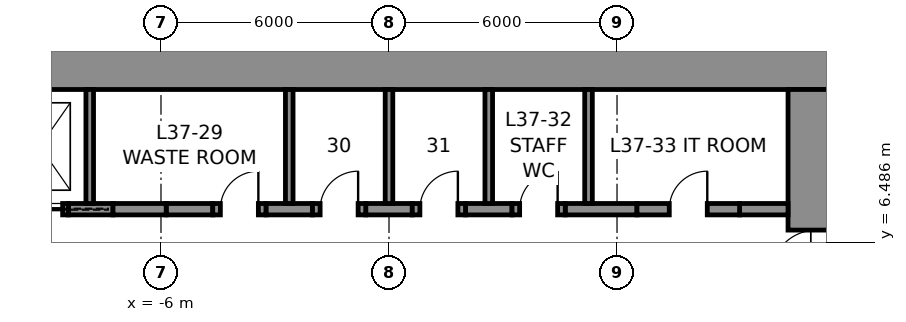
"""IFC4 building model, lengths in metres.
Left out: names, types, materials, properties, quantities, classifications, styles, units other than length and angle.
Written with IfcOpenShell. Run it as: python <this file> out.ifc"""

import sys

from ifc_helpers import new_model, si_unit, direction, frame, frame_2d, origin, place, context, subcontext, project, spatial, rectangle, extrude, element, fill, save


model = new_model("IFC4")
c1 = context("Model", 3, precision=1e-05, world=origin(), true_north=direction((0.0, 1.0)))
c2 = subcontext(c1, "Body", "Model", "MODEL_VIEW")
j1 = project(units=[si_unit("LENGTHUNIT", "METRE"), si_unit("PLANEANGLEUNIT", "RADIAN")], contexts=[c1])
p1 = place(None, origin())
s1 = spatial("IfcSite", under=j1, at=p1, CompositionType="ELEMENT")
p2 = place(p1, origin())
s2 = spatial("IfcBuilding", under=s1, at=p2, CompositionType="ELEMENT")
p3 = place(p2, frame((0.0, 0.0, 175.8)))
s3 = spatial("IfcBuildingStorey", under=s2, at=p3, CompositionType="ELEMENT", Elevation=175.8)
p4 = place(p3, frame((-12.0, 11.25, 0.0), z_axis=(0.0, 0.0, 1.0), x_axis=(1.0, 0.0, 0.0)))
e1 = element("IfcWall", 1, at=p4, inside=s3, PredefinedType="SHEAR", context=c2, shape_type="SweptSolid", body=[
    extrude(rectangle(XDim=24.0, YDim=1.5, at=frame_2d((12.0, 0.0))), origin(), (0.0, 0.0, 1.0), 4.0),
])
p5 = place(p3, frame((11.25, 10.5, 0.0), z_axis=(0.0, 0.0, 1.0), x_axis=(0.0, -1.0, 0.0)))
e2 = element("IfcWall", 2, at=p5, inside=s3, PredefinedType="SHEAR", context=c2, shape_type="SweptSolid", body=[
    extrude(rectangle(XDim=21.0, YDim=1.5, at=frame_2d((10.5, 0.0))), origin(), (0.0, 0.0, 1.0), 4.0),
])
p6 = place(p5, frame((3.7, 0.0, 0.0)))
e3 = element("IfcOpeningElement", 3, at=p6, cuts=e2, PredefinedType="OPENING", context=c2, shape_type="SweptSolid", body=[
    extrude(rectangle(XDim=1.2, YDim=2.3, at=frame_2d((0.6, 1.15))), frame((0.0, 0.76, 0.0), z_axis=(0.0, -1.0, 0.0), x_axis=(1.0, 0.0, 0.0)), (0.0, 0.0, 1.0), 1.52),
])
p7 = place(p5, frame((16.1, 0.0, 0.0)))
e4 = element("IfcOpeningElement", 4, at=p7, cuts=e2, PredefinedType="OPENING", context=c2, shape_type="SweptSolid", body=[
    extrude(rectangle(XDim=1.2, YDim=2.3, at=frame_2d((0.6, 1.15))), frame((0.0, 0.76, 0.0), z_axis=(0.0, -1.0, 0.0), x_axis=(1.0, 0.0, 0.0)), (0.0, 0.0, 1.0), 1.52),
])
p8 = place(p3, frame((-8.438, 7.35, 0.0), z_axis=(0.0, 0.0, 1.0), x_axis=(1.0, 0.0, 0.0)))
e5 = element("IfcWall", 5, at=p8, inside=s3, PredefinedType="SHEAR", context=c2, shape_type="SweptSolid", body=[
    extrude(rectangle(XDim=1.175, YDim=0.3, at=frame_2d((0.587, 0.0))), origin(), (0.0, 0.0, 1.0), 4.0),
])
for number, where, z_axis, x_axis in (
    (6, (-5.863, 7.35, 0.0), (0.0, 0.0, 1.0), (1.0, 0.0, 0.0)),
    (7, (-3.238, 7.35, 0.0), (0.0, 0.0, 1.0), (1.0, 0.0, 0.0)),
    (8, (-0.613, 7.35, 0.0), (0.0, 0.0, 1.0), (1.0, 0.0, 0.0)),
    (9, (2.012, 7.35, 0.0), (0.0, 0.0, 1.0), (1.0, 0.0, 0.0)),
):
    element("IfcWall", number, at=place(p3, frame(where, z_axis=z_axis, x_axis=x_axis)), inside=s3, PredefinedType="SHEAR", context=c2, shape_type="SweptSolid", body=[
        extrude(rectangle(XDim=1.225, YDim=0.3, at=frame_2d((0.613, 0.0))), origin(), (0.0, 0.0, 1.0), 4.0),
    ])
p9 = place(p3, frame((4.637, 7.35, 0.0), z_axis=(0.0, 0.0, 1.0), x_axis=(1.0, 0.0, 0.0)))
e10 = element("IfcWall", 10, at=p9, inside=s3, PredefinedType="SHEAR", context=c2, shape_type="SweptSolid", body=[
    extrude(rectangle(XDim=1.887, YDim=0.3, at=frame_2d((0.944, 0.0))), origin(), (0.0, 0.0, 1.0), 4.0),
])
p10 = place(p3, frame((9.225, 7.35, 0.0), z_axis=(0.0, 0.0, 1.0), x_axis=(1.0, 0.0, 0.0)))
e11 = element("IfcWall", 11, at=p10, inside=s3, PredefinedType="SHEAR", context=c2, shape_type="SweptSolid", body=[
    extrude(rectangle(XDim=1.275, YDim=0.3, at=frame_2d((0.637, 0.0))), origin(), (0.0, 0.0, 1.0), 4.0),
])
p11 = place(p3, frame((-9.938, 7.35, 0.0), z_axis=(0.0, 0.0, 1.0), x_axis=(1.0, 0.0, 0.0)))
e12 = element("IfcWall", 12, at=p11, inside=s3, PredefinedType="PARTITIONING", context=c2, shape_type="SweptSolid", body=[
    extrude(rectangle(XDim=1.5, YDim=0.3, at=frame_2d((0.75, 0.0))), origin(), (0.0, 0.0, 1.0), 4.0),
])
p12 = place(p11, frame((0.15, 0.0, 0.0)))
e13 = element("IfcOpeningElement", 13, at=p12, cuts=e12, PredefinedType="OPENING", context=c2, shape_type="SweptSolid", body=[
    extrude(rectangle(XDim=1.2, YDim=2.3, at=frame_2d((0.6, 1.15))), frame((0.0, 0.16, 0.0), z_axis=(0.0, -1.0, 0.0), x_axis=(1.0, 0.0, 0.0)), (0.0, 0.0, 1.0), 0.32),
])
p13 = place(p3, frame((-7.262, 7.35, 0.0), z_axis=(0.0, 0.0, 1.0), x_axis=(1.0, 0.0, 0.0)))
e14 = element("IfcWall", 14, at=p13, inside=s3, PredefinedType="PARTITIONING", context=c2, shape_type="SweptSolid", body=[
    extrude(rectangle(XDim=1.4, YDim=0.3, at=frame_2d((0.7, 0.0))), origin(), (0.0, 0.0, 1.0), 4.0),
])
p14 = place(p3, frame((-4.637, 7.35, 0.0), z_axis=(0.0, 0.0, 1.0), x_axis=(1.0, 0.0, 0.0)))
e15 = element("IfcWall", 15, at=p14, inside=s3, PredefinedType="PARTITIONING", context=c2, shape_type="SweptSolid", body=[
    extrude(rectangle(XDim=1.4, YDim=0.3, at=frame_2d((0.7, 0.0))), origin(), (0.0, 0.0, 1.0), 4.0),
])
p15 = place(p14, frame((0.2, 0.0, 0.0)))
e16 = element("IfcOpeningElement", 16, at=p15, cuts=e15, PredefinedType="OPENING", context=c2, shape_type="SweptSolid", body=[
    extrude(rectangle(XDim=1.0, YDim=2.3, at=frame_2d((0.5, 1.15))), frame((0.0, 0.16, 0.0), z_axis=(0.0, -1.0, 0.0), x_axis=(1.0, 0.0, 0.0)), (0.0, 0.0, 1.0), 0.32),
])
p16 = place(p3, frame((-2.012, 7.35, 0.0), z_axis=(0.0, 0.0, 1.0), x_axis=(1.0, 0.0, 0.0)))
e17 = element("IfcWall", 17, at=p16, inside=s3, PredefinedType="PARTITIONING", context=c2, shape_type="SweptSolid", body=[
    extrude(rectangle(XDim=1.4, YDim=0.3, at=frame_2d((0.7, 0.0))), origin(), (0.0, 0.0, 1.0), 4.0),
])
p17 = place(p16, frame((0.2, 0.0, 0.0)))
e18 = element("IfcOpeningElement", 18, at=p17, cuts=e17, PredefinedType="OPENING", context=c2, shape_type="SweptSolid", body=[
    extrude(rectangle(XDim=1.0, YDim=2.3, at=frame_2d((0.5, 1.15))), frame((0.0, 0.16, 0.0), z_axis=(0.0, -1.0, 0.0), x_axis=(1.0, 0.0, 0.0)), (0.0, 0.0, 1.0), 0.32),
])
p18 = place(p3, frame((0.613, 7.35, 0.0), z_axis=(0.0, 0.0, 1.0), x_axis=(1.0, 0.0, 0.0)))
e19 = element("IfcWall", 19, at=p18, inside=s3, PredefinedType="PARTITIONING", context=c2, shape_type="SweptSolid", body=[
    extrude(rectangle(XDim=1.4, YDim=0.3, at=frame_2d((0.7, 0.0))), origin(), (0.0, 0.0, 1.0), 4.0),
])
p19 = place(p18, frame((0.2, 0.0, 0.0)))
e20 = element("IfcOpeningElement", 20, at=p19, cuts=e19, PredefinedType="OPENING", context=c2, shape_type="SweptSolid", body=[
    extrude(rectangle(XDim=1.0, YDim=2.3, at=frame_2d((0.5, 1.15))), frame((0.0, 0.16, 0.0), z_axis=(0.0, -1.0, 0.0), x_axis=(1.0, 0.0, 0.0)), (0.0, 0.0, 1.0), 0.32),
])
p20 = place(p3, frame((3.238, 7.35, 0.0), z_axis=(0.0, 0.0, 1.0), x_axis=(1.0, 0.0, 0.0)))
e21 = element("IfcWall", 21, at=p20, inside=s3, PredefinedType="PARTITIONING", context=c2, shape_type="SweptSolid", body=[
    extrude(rectangle(XDim=1.4, YDim=0.3, at=frame_2d((0.7, 0.0))), origin(), (0.0, 0.0, 1.0), 4.0),
])
p21 = place(p20, frame((0.2, 0.0, 0.0)))
e22 = element("IfcOpeningElement", 22, at=p21, cuts=e21, PredefinedType="OPENING", context=c2, shape_type="SweptSolid", body=[
    extrude(rectangle(XDim=1.0, YDim=2.3, at=frame_2d((0.5, 1.15))), frame((0.0, 0.16, 0.0), z_axis=(0.0, -1.0, 0.0), x_axis=(1.0, 0.0, 0.0)), (0.0, 0.0, 1.0), 0.32),
])
p22 = place(p3, frame((6.525, 7.35, 0.0), z_axis=(0.0, 0.0, 1.0), x_axis=(1.0, 0.0, 0.0)))
e23 = element("IfcWall", 23, at=p22, inside=s3, PredefinedType="PARTITIONING", context=c2, shape_type="SweptSolid", body=[
    extrude(rectangle(XDim=2.7, YDim=0.3, at=frame_2d((1.35, 0.0))), origin(), (0.0, 0.0, 1.0), 4.0),
])
p23 = place(p22, frame((0.85, 0.0, 0.0)))
e24 = element("IfcOpeningElement", 24, at=p23, cuts=e23, PredefinedType="OPENING", context=c2, shape_type="SweptSolid", body=[
    extrude(rectangle(XDim=1.0, YDim=2.3, at=frame_2d((0.5, 1.15))), frame((0.0, 0.16, 0.0), z_axis=(0.0, -1.0, 0.0), x_axis=(1.0, 0.0, 0.0)), (0.0, 0.0, 1.0), 0.32),
])
for number, where, z_axis, x_axis in (
    (25, (-7.875, 7.5, 0.0), (0.0, 0.0, 1.0), (0.0, 1.0, 0.0)),
    (26, (-2.625, 7.5, 0.0), (0.0, 0.0, 1.0), (0.0, 1.0, 0.0)),
    (27, (0.0, 7.5, 0.0), (0.0, 0.0, 1.0), (0.0, 1.0, 0.0)),
    (28, (2.625, 7.5, 0.0), (0.0, 0.0, 1.0), (0.0, 1.0, 0.0)),
    (29, (5.25, 7.5, 0.0), (0.0, 0.0, 1.0), (0.0, 1.0, 0.0)),
):
    element("IfcWall", number, at=place(p3, frame(where, z_axis=z_axis, x_axis=x_axis)), inside=s3, PredefinedType="PARTITIONING", context=c2, shape_type="SweptSolid", body=[
        extrude(rectangle(XDim=3.0, YDim=0.2, at=frame_2d((1.5, 0.0))), origin(), (0.0, 0.0, 1.0), 4.0),
    ])
p24 = place(p15, origin())
e30 = element("IfcDoor", 30, at=p24, inside=s3, OperationType="SINGLE_SWING_RIGHT", PredefinedType="DOOR", context=c2, shape_type="SweptSolid", body=[
    extrude(rectangle(XDim=1.0, YDim=2.3, at=frame_2d((0.5, 1.15))), frame((0.0, 0.025, 0.0), z_axis=(0.0, -1.0, 0.0), x_axis=(1.0, 0.0, 0.0)), (0.0, 0.0, 1.0), 0.05),
])
fill(e16, e30)
p25 = place(p17, origin())
e31 = element("IfcDoor", 31, at=p25, inside=s3, OperationType="SINGLE_SWING_RIGHT", PredefinedType="DOOR", context=c2, shape_type="SweptSolid", body=[
    extrude(rectangle(XDim=1.0, YDim=2.3, at=frame_2d((0.5, 1.15))), frame((0.0, 0.025, 0.0), z_axis=(0.0, -1.0, 0.0), x_axis=(1.0, 0.0, 0.0)), (0.0, 0.0, 1.0), 0.05),
])
fill(e18, e31)
p26 = place(p19, origin())
e32 = element("IfcDoor", 32, at=p26, inside=s3, OperationType="SINGLE_SWING_RIGHT", PredefinedType="DOOR", context=c2, shape_type="SweptSolid", body=[
    extrude(rectangle(XDim=1.0, YDim=2.3, at=frame_2d((0.5, 1.15))), frame((0.0, 0.025, 0.0), z_axis=(0.0, -1.0, 0.0), x_axis=(1.0, 0.0, 0.0)), (0.0, 0.0, 1.0), 0.05),
])
fill(e20, e32)
p27 = place(p21, origin())
e33 = element("IfcDoor", 33, at=p27, inside=s3, OperationType="SINGLE_SWING_RIGHT", PredefinedType="DOOR", context=c2, shape_type="SweptSolid", body=[
    extrude(rectangle(XDim=1.0, YDim=2.3, at=frame_2d((0.5, 1.15))), frame((0.0, 0.025, 0.0), z_axis=(0.0, -1.0, 0.0), x_axis=(1.0, 0.0, 0.0)), (0.0, 0.0, 1.0), 0.05),
])
fill(e22, e33)
p28 = place(p23, origin())
e34 = element("IfcDoor", 34, at=p28, inside=s3, OperationType="SINGLE_SWING_RIGHT", PredefinedType="DOOR", context=c2, shape_type="SweptSolid", body=[
    extrude(rectangle(XDim=1.0, YDim=2.3, at=frame_2d((0.5, 1.15))), frame((0.0, 0.025, 0.0), z_axis=(0.0, -1.0, 0.0), x_axis=(1.0, 0.0, 0.0)), (0.0, 0.0, 1.0), 0.05),
])
fill(e24, e34)
p29 = place(p6, frame((1.2, 0.0, 0.0), z_axis=(0.0, 0.0, 1.0), x_axis=(-1.0, 0.0, 0.0)))
e35 = element("IfcDoor", 35, at=p29, inside=s3, OperationType="SINGLE_SWING_LEFT", PredefinedType="DOOR", context=c2, shape_type="SweptSolid", body=[
    extrude(rectangle(XDim=1.2, YDim=2.3, at=frame_2d((0.6, 1.15))), frame((0.0, 0.025, 0.0), z_axis=(0.0, -1.0, 0.0), x_axis=(1.0, 0.0, 0.0)), (0.0, 0.0, 1.0), 0.05),
])
fill(e3, e35)
p30 = place(p12, frame((1.2, 0.0, 0.0), z_axis=(0.0, 0.0, 1.0), x_axis=(-1.0, 0.0, 0.0)))
e36 = element("IfcDoor", 36, at=p30, inside=s3, OperationType="SLIDING_TO_LEFT", PredefinedType="DOOR", context=c2, shape_type="SweptSolid", body=[
    extrude(rectangle(XDim=1.2, YDim=2.3, at=frame_2d((0.6, 1.15))), frame((0.0, 0.025, 0.0), z_axis=(0.0, -1.0, 0.0), x_axis=(1.0, 0.0, 0.0)), (0.0, 0.0, 1.0), 0.05),
])
fill(e13, e36)
save(model, sys.argv[1])
